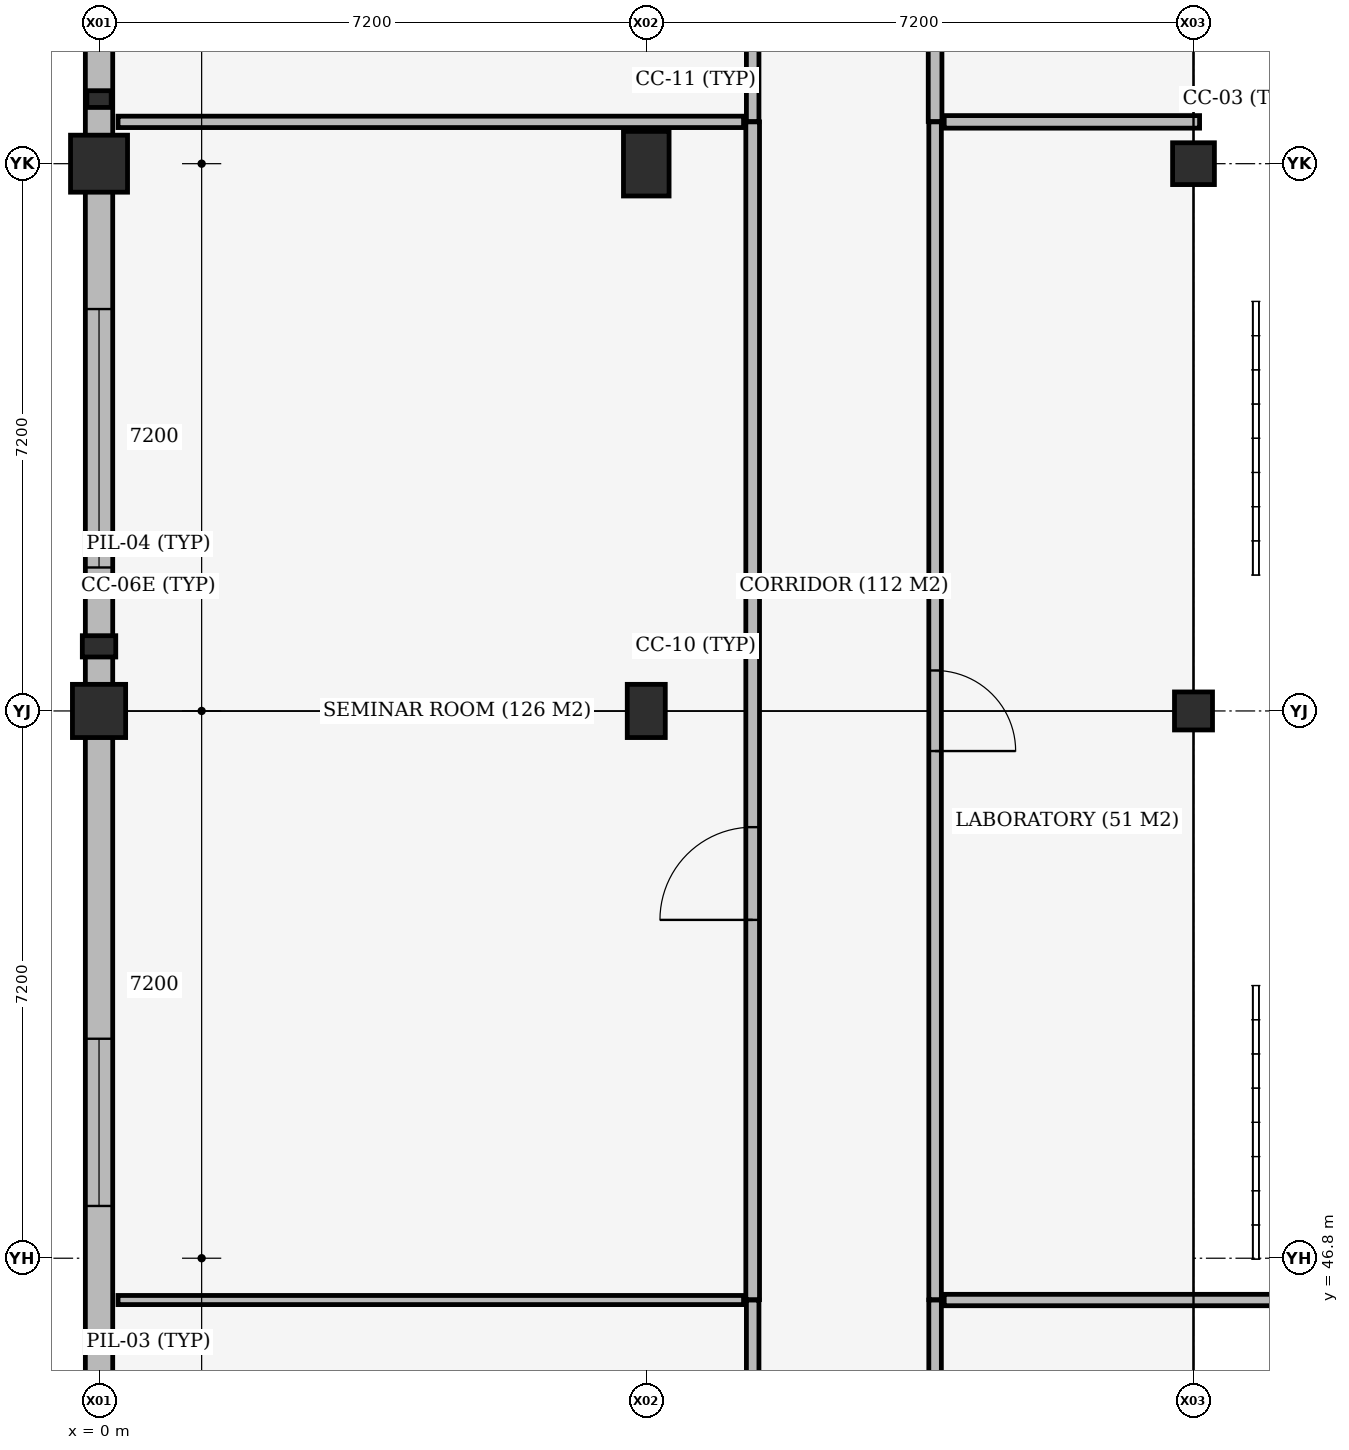
"""IFC4 building model, lengths in metres.
Left out: names, types, materials, properties, quantities, classifications, styles, units other than length and angle.
Written with IfcOpenShell. Run it as: python <this file> out.ifc"""

import sys

from ifc_helpers import new_model, si_unit, direction, frame, frame_2d, origin, origin_2d, place, context, subcontext, project, spatial, rectangle, extrude, element, fill, save


model = new_model("IFC4")
c1 = context("Model", 3, precision=1e-05, world=origin(), true_north=direction((0.0, 1.0)))
c2 = subcontext(c1, "Body", "Model", "MODEL_VIEW")
j1 = project(units=[si_unit("LENGTHUNIT", "METRE"), si_unit("PLANEANGLEUNIT", "RADIAN")], contexts=[c1])
p1 = place(None, origin())
s1 = spatial("IfcSite", under=j1, at=p1, CompositionType="ELEMENT")
p2 = place(p1, origin())
s2 = spatial("IfcBuilding", under=s1, at=p2, CompositionType="ELEMENT")
p3 = place(p2, frame((0.0, 0.0, 5.4)))
s3 = spatial("IfcBuildingStorey", under=s2, at=p3, CompositionType="ELEMENT", Elevation=5.4)
p4 = place(p3, frame((0.0, 54.0, 0.0), z_axis=(0.0, 0.0, 1.0), x_axis=(1.0, 0.0, 0.0)))
e1 = element("IfcColumn", 1, at=p4, inside=s3, PredefinedType="COLUMN", context=c2, shape_type="SweptSolid", body=[
    extrude(rectangle(XDim=0.7, YDim=0.7, at=origin_2d()), origin(), (0.0, 0.0, 1.0), 3.89),
])
p5 = place(p3, frame((0.0, 61.2, 0.0), z_axis=(0.0, 0.0, 1.0), x_axis=(1.0, 0.0, 0.0)))
e2 = element("IfcColumn", 2, at=p5, inside=s3, PredefinedType="COLUMN", context=c2, shape_type="SweptSolid", body=[
    extrude(rectangle(XDim=0.75, YDim=0.75, at=origin_2d()), origin(), (0.0, 0.0, 1.0), 3.89),
])
p6 = place(p3, frame((7.2, 54.0, 0.0), z_axis=(0.0, 0.0, 1.0), x_axis=(1.0, 0.0, 0.0)))
e3 = element("IfcColumn", 3, at=p6, inside=s3, PredefinedType="COLUMN", context=c2, shape_type="SweptSolid", body=[
    extrude(rectangle(XDim=0.5, YDim=0.7, at=origin_2d()), origin(), (0.0, 0.0, 1.0), 3.89),
])
p7 = place(p3, frame((7.2, 61.2, 0.0), z_axis=(0.0, 0.0, 1.0), x_axis=(1.0, 0.0, 0.0)))
e4 = element("IfcColumn", 4, at=p7, inside=s3, PredefinedType="COLUMN", context=c2, shape_type="SweptSolid", body=[
    extrude(rectangle(XDim=0.6, YDim=0.85, at=origin_2d()), origin(), (0.0, 0.0, 1.0), 3.89),
])
p8 = place(p3, frame((14.4, 54.0, 0.0), z_axis=(0.0, 0.0, 1.0), x_axis=(1.0, 0.0, 0.0)))
e5 = element("IfcColumn", 5, at=p8, inside=s3, PredefinedType="COLUMN", context=c2, shape_type="SweptSolid", body=[
    extrude(rectangle(XDim=0.5, YDim=0.5, at=origin_2d()), origin(), (0.0, 0.0, 1.0), 3.89),
])
p9 = place(p3, frame((14.4, 61.2, 0.0), z_axis=(0.0, 0.0, 1.0), x_axis=(1.0, 0.0, 0.0)))
e6 = element("IfcColumn", 6, at=p9, inside=s3, PredefinedType="COLUMN", context=c2, shape_type="SweptSolid", body=[
    extrude(rectangle(XDim=0.55, YDim=0.55, at=origin_2d()), origin(), (0.0, 0.0, 1.0), 3.89),
])
p10 = place(p3, frame((0.0, 54.85, 0.0), z_axis=(0.0, 0.0, 1.0), x_axis=(1.0, 0.0, 0.0)))
e7 = element("IfcColumn", 7, at=p10, inside=s3, PredefinedType="PILASTER", context=c2, shape_type="SweptSolid", body=[
    extrude(rectangle(XDim=0.44, YDim=0.28, at=origin_2d()), origin(), (0.0, 0.0, 1.0), 3.89),
])
p11 = place(p3, frame((0.0, 62.05, 0.0), z_axis=(0.0, 0.0, 1.0), x_axis=(1.0, 0.0, 0.0)))
e8 = element("IfcColumn", 8, at=p11, inside=s3, PredefinedType="PILASTER", context=c2, shape_type="SweptSolid", body=[
    extrude(rectangle(XDim=0.32, YDim=0.22, at=origin_2d()), origin(), (0.0, 0.0, 1.0), 3.89),
])
p12 = place(p3, frame((0.0, 43.517, 0.0), z_axis=(0.0, 0.0, 1.0), x_axis=(0.0, 1.0, 0.0)))
e9 = element("IfcWall", 9, at=p12, inside=s3, PredefinedType="STANDARD", context=c2, shape_type="SweptSolid", body=[
    extrude(rectangle(XDim=10.141, YDim=0.36, at=frame_2d((5.07, 0.0))), origin(), (0.0, 0.0, 1.0), 3.31),
])
p13 = place(p12, frame((3.97, 0.0, 0.9)))
e10 = element("IfcOpeningElement", 10, at=p13, cuts=e9, PredefinedType="OPENING", context=c2, shape_type="SweptSolid", body=[
    extrude(rectangle(XDim=2.2, YDim=2.2, at=frame_2d((1.1, 1.1))), frame((0.0, 0.19, 0.0), z_axis=(0.0, -1.0, 0.0), x_axis=(1.0, 0.0, 0.0)), (0.0, 0.0, 1.0), 0.38),
])
p14 = place(p3, frame((0.0, 54.342, 0.0), z_axis=(0.0, 0.0, 1.0), x_axis=(0.0, 1.0, 0.0)))
e11 = element("IfcWall", 11, at=p14, inside=s3, PredefinedType="STANDARD", context=c2, shape_type="SweptSolid", body=[
    extrude(rectangle(XDim=6.491, YDim=0.36, at=frame_2d((3.246, 0.0))), origin(), (0.0, 0.0, 1.0), 3.25),
])
p15 = place(p14, frame((1.545, 0.0, 0.9)))
e12 = element("IfcOpeningElement", 12, at=p15, cuts=e11, PredefinedType="OPENING", context=c2, shape_type="SweptSolid", body=[
    extrude(rectangle(XDim=3.4, YDim=1.5, at=frame_2d((1.7, 0.75))), frame((0.0, 0.19, 0.0), z_axis=(0.0, -1.0, 0.0), x_axis=(1.0, 0.0, 0.0)), (0.0, 0.0, 1.0), 0.38),
])
p16 = place(p3, frame((0.0, 61.567, 0.0), z_axis=(0.0, 0.0, 1.0), x_axis=(0.0, 1.0, 0.0)))
e13 = element("IfcWall", 13, at=p16, inside=s3, PredefinedType="STANDARD", context=c2, shape_type="SweptSolid", body=[
    extrude(rectangle(XDim=6.441, YDim=0.36, at=frame_2d((3.221, 0.0))), origin(), (0.0, 0.0, 1.0), 3.21),
])
p17 = place(p16, frame((1.521, 0.0, 0.9)))
e14 = element("IfcOpeningElement", 14, at=p17, cuts=e13, PredefinedType="OPENING", context=c2, shape_type="SweptSolid", body=[
    extrude(rectangle(XDim=3.4, YDim=1.5, at=frame_2d((1.7, 0.75))), frame((0.0, 0.19, 0.0), z_axis=(0.0, -1.0, 0.0), x_axis=(1.0, 0.0, 0.0)), (0.0, 0.0, 1.0), 0.38),
])
p18 = place(p3, frame((8.6, 41.605, 0.0), z_axis=(0.0, 0.0, 1.0), x_axis=(0.0, 1.0, 0.0)))
e15 = element("IfcWall", 15, at=p18, inside=s3, PredefinedType="PARTITIONING", context=c2, shape_type="SweptSolid", body=[
    extrude(rectangle(XDim=4.645, YDim=0.165, at=frame_2d((2.323, 0.0))), origin(), (0.0, 0.0, 1.0), 3.37),
])
p19 = place(p18, frame((2.33, 0.0, 0.0)))
e16 = element("IfcOpeningElement", 16, at=p19, cuts=e15, PredefinedType="OPENING", context=c2, shape_type="SweptSolid", body=[
    extrude(rectangle(XDim=1.06, YDim=2.2, at=frame_2d((0.53, 1.1))), frame((0.0, 0.093, 0.0), z_axis=(0.0, -1.0, 0.0), x_axis=(1.0, 0.0, 0.0)), (0.0, 0.0, 1.0), 0.185),
])
p20 = place(p3, frame((0.25, 46.25, 0.0), z_axis=(0.0, 0.0, 1.0), x_axis=(1.0, 0.0, 0.0)))
e17 = element("IfcWall", 17, at=p20, inside=s3, PredefinedType="PARTITIONING", context=c2, shape_type="SweptSolid", body=[
    extrude(rectangle(XDim=8.23, YDim=0.12, at=frame_2d((4.115, 0.0))), origin(), (0.0, 0.0, 1.0), 3.25),
])
p21 = place(p3, frame((8.6, 46.255, 0.0), z_axis=(0.0, 0.0, 1.0), x_axis=(0.0, 1.0, 0.0)))
e18 = element("IfcWall", 18, at=p21, inside=s3, PredefinedType="PARTITIONING", context=c2, shape_type="SweptSolid", body=[
    extrude(rectangle(XDim=15.495, YDim=0.18, at=frame_2d((7.748, 0.0))), origin(), (0.0, 0.0, 1.0), 3.15),
])
p22 = place(p21, frame((4.996, 0.0, 0.0)))
e19 = element("IfcOpeningElement", 19, at=p22, cuts=e18, PredefinedType="OPENING", context=c2, shape_type="SweptSolid", body=[
    extrude(rectangle(XDim=1.22, YDim=2.25, at=frame_2d((0.61, 1.125))), frame((0.0, 0.1, 0.0), z_axis=(0.0, -1.0, 0.0), x_axis=(1.0, 0.0, 0.0)), (0.0, 0.0, 1.0), 0.2),
])
p23 = place(p3, frame((0.25, 61.75, 0.0), z_axis=(0.0, 0.0, 1.0), x_axis=(1.0, 0.0, 0.0)))
e20 = element("IfcWall", 20, at=p23, inside=s3, PredefinedType="PARTITIONING", context=c2, shape_type="SweptSolid", body=[
    extrude(rectangle(XDim=8.23, YDim=0.15, at=frame_2d((4.115, 0.0))), origin(), (0.0, 0.0, 1.0), 3.15),
])
p24 = place(p3, frame((8.6, 61.755, 0.0), z_axis=(0.0, 0.0, 1.0), x_axis=(0.0, 1.0, 0.0)))
e21 = element("IfcWall", 21, at=p24, inside=s3, PredefinedType="PARTITIONING", context=c2, shape_type="SweptSolid", body=[
    extrude(rectangle(XDim=6.64, YDim=0.165, at=frame_2d((3.32, 0.0))), origin(), (0.0, 0.0, 1.0), 3.25),
])
p25 = place(p24, frame((2.79, 0.0, 0.0)))
e22 = element("IfcOpeningElement", 22, at=p25, cuts=e21, PredefinedType="OPENING", context=c2, shape_type="SweptSolid", body=[
    extrude(rectangle(XDim=1.06, YDim=2.2, at=frame_2d((0.53, 1.1))), frame((0.0, 0.093, 0.0), z_axis=(0.0, -1.0, 0.0), x_axis=(1.0, 0.0, 0.0)), (0.0, 0.0, 1.0), 0.185),
])
p26 = place(p3, frame((11.0, 33.338, 0.0), z_axis=(0.0, 0.0, 1.0), x_axis=(0.0, 1.0, 0.0)))
e23 = element("IfcWall", 23, at=p26, inside=s3, PredefinedType="PARTITIONING", context=c2, shape_type="SweptSolid", body=[
    extrude(rectangle(XDim=12.912, YDim=0.165, at=frame_2d((6.456, 0.0))), origin(), (0.0, 0.0, 1.0), 3.15),
])
p27 = place(p26, frame((5.931, 0.0, 0.0)))
e24 = element("IfcOpeningElement", 24, at=p27, cuts=e23, PredefinedType="OPENING", context=c2, shape_type="SweptSolid", body=[
    extrude(rectangle(XDim=1.05, YDim=2.2, at=frame_2d((0.525, 1.1))), frame((0.0, 0.093, 0.0), z_axis=(0.0, -1.0, 0.0), x_axis=(1.0, 0.0, 0.0)), (0.0, 0.0, 1.0), 0.185),
])
p28 = place(p3, frame((11.12, 46.25, 0.0), z_axis=(0.0, 0.0, 1.0), x_axis=(1.0, 0.0, 0.0)))
e25 = element("IfcWall", 25, at=p28, inside=s3, PredefinedType="PARTITIONING", context=c2, shape_type="SweptSolid", body=[
    extrude(rectangle(XDim=18.96, YDim=0.15, at=frame_2d((9.48, 0.0))), origin(), (0.0, 0.0, 1.0), 3.15),
])
p29 = place(p3, frame((11.0, 46.255, 0.0), z_axis=(0.0, 0.0, 1.0), x_axis=(0.0, 1.0, 0.0)))
e26 = element("IfcWall", 26, at=p29, inside=s3, PredefinedType="PARTITIONING", context=c2, shape_type="SweptSolid", body=[
    extrude(rectangle(XDim=15.495, YDim=0.165, at=frame_2d((7.748, 0.0))), origin(), (0.0, 0.0, 1.0), 3.15),
])
p30 = place(p29, frame((7.218, 0.0, 0.0)))
e27 = element("IfcOpeningElement", 27, at=p30, cuts=e26, PredefinedType="OPENING", context=c2, shape_type="SweptSolid", body=[
    extrude(rectangle(XDim=1.06, YDim=2.2, at=frame_2d((0.53, 1.1))), frame((0.0, 0.093, 0.0), z_axis=(0.0, -1.0, 0.0), x_axis=(1.0, 0.0, 0.0)), (0.0, 0.0, 1.0), 0.185),
])
p31 = place(p3, frame((11.12, 61.75, 0.0), z_axis=(0.0, 0.0, 1.0), x_axis=(1.0, 0.0, 0.0)))
e28 = element("IfcWall", 28, at=p31, inside=s3, PredefinedType="PARTITIONING", context=c2, shape_type="SweptSolid", body=[
    extrude(rectangle(XDim=3.36, YDim=0.165, at=frame_2d((1.68, 0.0))), origin(), (0.0, 0.0, 1.0), 3.31),
])
p32 = place(p3, frame((11.0, 61.755, 0.0), z_axis=(0.0, 0.0, 1.0), x_axis=(0.0, 1.0, 0.0)))
e29 = element("IfcWall", 29, at=p32, inside=s3, PredefinedType="PARTITIONING", context=c2, shape_type="SweptSolid", body=[
    extrude(rectangle(XDim=5.705, YDim=0.18, at=frame_2d((2.853, 0.0))), origin(), (0.0, 0.0, 1.0), 3.89),
])
p33 = place(p32, frame((2.242, 0.0, 0.0)))
e30 = element("IfcOpeningElement", 30, at=p33, cuts=e29, PredefinedType="OPENING", context=c2, shape_type="SweptSolid", body=[
    extrude(rectangle(XDim=1.22, YDim=2.25, at=frame_2d((0.61, 1.125))), frame((0.0, 0.1, 0.0), z_axis=(0.0, -1.0, 0.0), x_axis=(1.0, 0.0, 0.0)), (0.0, 0.0, 1.0), 0.2),
])
p34 = place(p13, origin())
e31 = element("IfcWindow", 31, at=p34, inside=s3, PartitioningType="DOUBLE_PANEL_VERTICAL", PredefinedType="WINDOW", context=c2, shape_type="SweptSolid", body=[
    extrude(rectangle(XDim=2.2, YDim=2.2, at=frame_2d((1.1, 1.1))), frame((0.0, 0.03, 0.0), z_axis=(0.0, -1.0, 0.0), x_axis=(1.0, 0.0, 0.0)), (0.0, 0.0, 1.0), 0.06),
])
fill(e10, e31)
p35 = place(p15, origin())
e32 = element("IfcWindow", 32, at=p35, inside=s3, PartitioningType="DOUBLE_PANEL_VERTICAL", PredefinedType="WINDOW", context=c2, shape_type="SweptSolid", body=[
    extrude(rectangle(XDim=3.4, YDim=1.5, at=frame_2d((1.7, 0.75))), frame((0.0, 0.03, 0.0), z_axis=(0.0, -1.0, 0.0), x_axis=(1.0, 0.0, 0.0)), (0.0, 0.0, 1.0), 0.06),
])
fill(e12, e32)
p36 = place(p22, origin())
e33 = element("IfcDoor", 33, at=p36, inside=s3, OperationType="SINGLE_SWING_LEFT", PredefinedType="DOOR", context=c2, shape_type="SweptSolid", body=[
    extrude(rectangle(XDim=1.22, YDim=2.25, at=frame_2d((0.61, 1.125))), frame((0.0, 0.025, 0.0), z_axis=(0.0, -1.0, 0.0), x_axis=(1.0, 0.0, 0.0)), (0.0, 0.0, 1.0), 0.05),
])
fill(e19, e33)
p37 = place(p30, origin())
e34 = element("IfcDoor", 34, at=p37, inside=s3, OperationType="SINGLE_SWING_RIGHT", PredefinedType="DOOR", context=c2, shape_type="SweptSolid", body=[
    extrude(rectangle(XDim=1.06, YDim=2.2, at=frame_2d((0.53, 1.1))), frame((0.0, 0.025, 0.0), z_axis=(0.0, -1.0, 0.0), x_axis=(1.0, 0.0, 0.0)), (0.0, 0.0, 1.0), 0.05),
])
fill(e27, e34)
save(model, sys.argv[1])
